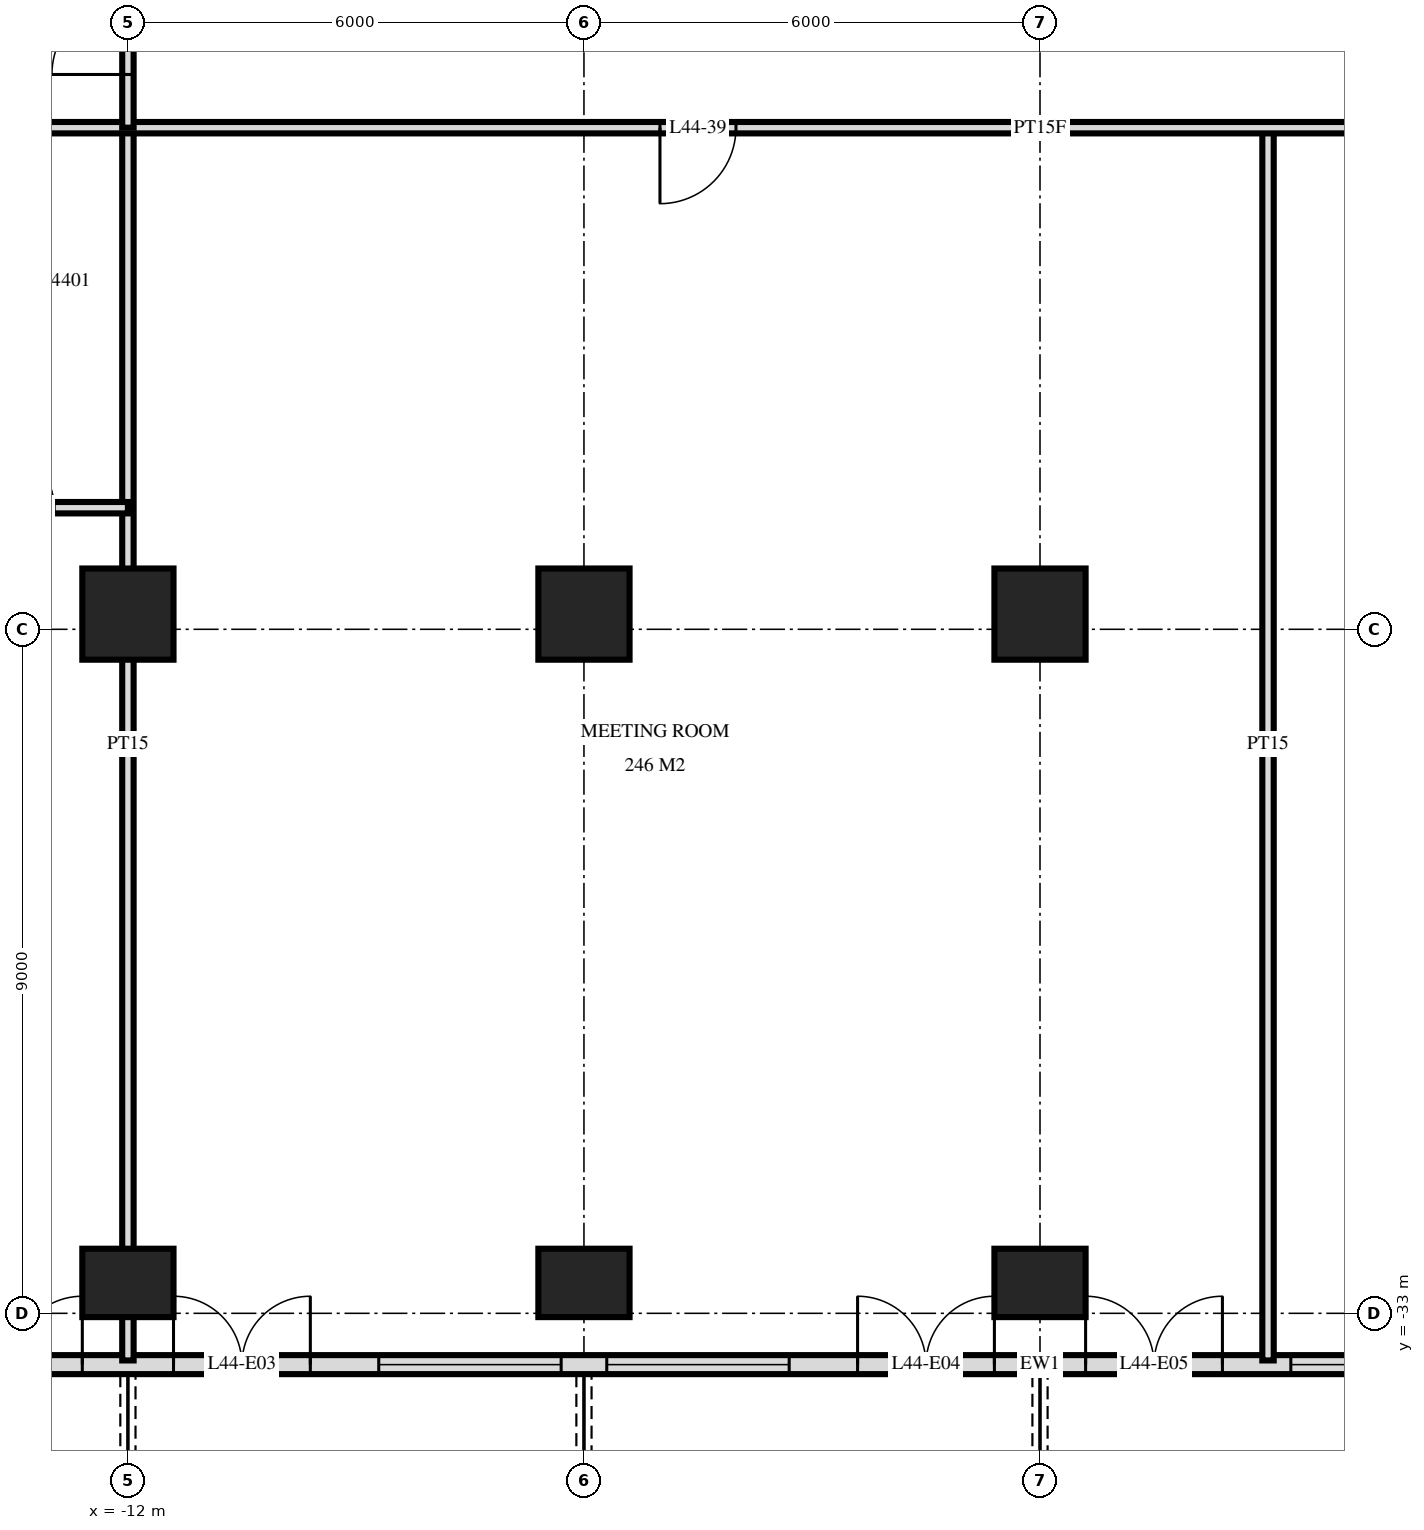
"""IFC4 building model, lengths in metres.
Left out: names, types, materials, properties, quantities, classifications, styles, units other than length and angle.
Written with IfcOpenShell. Run it as: python <this file> out.ifc"""

import sys

from ifc_helpers import new_model, si_unit, direction, frame, frame_2d, origin, origin_2d, place, context, subcontext, project, spatial, rectangle, extrude, element, fill, save


model = new_model("IFC4")
c1 = context("Model", 3, precision=1e-05, world=origin(), true_north=direction((0.0, 1.0)))
c2 = subcontext(c1, "Body", "Model", "MODEL_VIEW")
j1 = project(units=[si_unit("LENGTHUNIT", "METRE"), si_unit("PLANEANGLEUNIT", "RADIAN")], contexts=[c1])
p1 = place(None, origin())
s1 = spatial("IfcSite", under=j1, at=p1, CompositionType="ELEMENT")
p2 = place(p1, origin())
s2 = spatial("IfcBuilding", under=s1, at=p2, CompositionType="ELEMENT")
p3 = place(p2, frame((0.0, 0.0, 170.4)))
s3 = spatial("IfcBuildingStorey", under=s2, at=p3, CompositionType="ELEMENT", Elevation=170.4)
p4 = place(p3, frame((-12.0, -32.6, 0.0), z_axis=(0.0, 0.0, 1.0), x_axis=(1.0, 0.0, 0.0)))
e1 = element("IfcColumn", 1, at=p4, inside=s3, PredefinedType="COLUMN", context=c2, shape_type="SweptSolid", body=[
    extrude(rectangle(XDim=1.2, YDim=0.9, at=origin_2d()), origin(), (0.0, 0.0, 1.0), 3.6),
])
p5 = place(p3, frame((-12.0, -23.8, 0.0), z_axis=(0.0, 0.0, 1.0), x_axis=(1.0, 0.0, 0.0)))
e2 = element("IfcColumn", 2, at=p5, inside=s3, PredefinedType="COLUMN", context=c2, shape_type="SweptSolid", body=[
    extrude(rectangle(XDim=1.2, YDim=1.2, at=origin_2d()), origin(), (0.0, 0.0, 1.0), 3.6),
])
p6 = place(p3, frame((-6.0, -32.6, 0.0), z_axis=(0.0, 0.0, 1.0), x_axis=(1.0, 0.0, 0.0)))
e3 = element("IfcColumn", 3, at=p6, inside=s3, PredefinedType="COLUMN", context=c2, shape_type="SweptSolid", body=[
    extrude(rectangle(XDim=1.2, YDim=0.9, at=origin_2d()), origin(), (0.0, 0.0, 1.0), 3.6),
])
p7 = place(p3, frame((-6.0, -23.8, 0.0), z_axis=(0.0, 0.0, 1.0), x_axis=(1.0, 0.0, 0.0)))
e4 = element("IfcColumn", 4, at=p7, inside=s3, PredefinedType="COLUMN", context=c2, shape_type="SweptSolid", body=[
    extrude(rectangle(XDim=1.2, YDim=1.2, at=origin_2d()), origin(), (0.0, 0.0, 1.0), 3.6),
])
p8 = place(p3, frame((0.0, -32.6, 0.0), z_axis=(0.0, 0.0, 1.0), x_axis=(1.0, 0.0, 0.0)))
e5 = element("IfcColumn", 5, at=p8, inside=s3, PredefinedType="COLUMN", context=c2, shape_type="SweptSolid", body=[
    extrude(rectangle(XDim=1.2, YDim=0.9, at=origin_2d()), origin(), (0.0, 0.0, 1.0), 3.6),
])
p9 = place(p3, frame((0.0, -23.8, 0.0), z_axis=(0.0, 0.0, 1.0), x_axis=(1.0, 0.0, 0.0)))
e6 = element("IfcColumn", 6, at=p9, inside=s3, PredefinedType="COLUMN", context=c2, shape_type="SweptSolid", body=[
    extrude(rectangle(XDim=1.2, YDim=1.2, at=origin_2d()), origin(), (0.0, 0.0, 1.0), 3.6),
])
p10 = place(p3, frame((-23.675, -33.675, 0.0), z_axis=(0.0, 0.0, 1.0), x_axis=(1.0, 0.0, 0.0)))
e7 = element("IfcWall", 7, at=p10, inside=s3, PredefinedType="SOLIDWALL", context=c2, shape_type="SweptSolid", body=[
    extrude(rectangle(XDim=47.351, YDim=0.25, at=frame_2d((23.675, 0.0))), origin(), (0.0, 0.0, 1.0), 3.32),
])
p11 = place(p10, frame((0.575, 0.0, 0.0)))
e8 = element("IfcOpeningElement", 8, at=p11, cuts=e7, PredefinedType="OPENING", context=c2, shape_type="SweptSolid", body=[
    extrude(rectangle(XDim=1.8, YDim=2.4, at=frame_2d((0.9, 1.2))), frame((0.0, 0.135, 0.0), z_axis=(0.0, -1.0, 0.0), x_axis=(1.0, 0.0, 0.0)), (0.0, 0.0, 1.0), 0.27),
])
p12 = place(p10, frame((3.425, 0.0, 0.3)))
e9 = element("IfcOpeningElement", 9, at=p12, cuts=e7, PredefinedType="OPENING", context=c2, shape_type="SweptSolid", body=[
    extrude(rectangle(XDim=1.8, YDim=2.1, at=frame_2d((0.9, 1.05))), frame((0.0, 0.135, 0.0), z_axis=(0.0, -1.0, 0.0), x_axis=(1.0, 0.0, 0.0)), (0.0, 0.0, 1.0), 0.27),
])
p13 = place(p10, frame((5.975, 0.0, 0.3)))
e10 = element("IfcOpeningElement", 10, at=p13, cuts=e7, PredefinedType="OPENING", context=c2, shape_type="SweptSolid", body=[
    extrude(rectangle(XDim=2.4, YDim=2.1, at=frame_2d((1.2, 1.05))), frame((0.0, 0.135, 0.0), z_axis=(0.0, -1.0, 0.0), x_axis=(1.0, 0.0, 0.0)), (0.0, 0.0, 1.0), 0.27),
])
p14 = place(p10, frame((9.275, 0.0, 0.0)))
e11 = element("IfcOpeningElement", 11, at=p14, cuts=e7, PredefinedType="OPENING", context=c2, shape_type="SweptSolid", body=[
    extrude(rectangle(XDim=1.8, YDim=2.4, at=frame_2d((0.9, 1.2))), frame((0.0, 0.135, 0.0), z_axis=(0.0, -1.0, 0.0), x_axis=(1.0, 0.0, 0.0)), (0.0, 0.0, 1.0), 0.27),
])
p15 = place(p10, frame((12.275, 0.0, 0.0)))
e12 = element("IfcOpeningElement", 12, at=p15, cuts=e7, PredefinedType="OPENING", context=c2, shape_type="SweptSolid", body=[
    extrude(rectangle(XDim=1.8, YDim=2.4, at=frame_2d((0.9, 1.2))), frame((0.0, 0.135, 0.0), z_axis=(0.0, -1.0, 0.0), x_axis=(1.0, 0.0, 0.0)), (0.0, 0.0, 1.0), 0.27),
])
p16 = place(p10, frame((14.975, 0.0, 0.3)))
e13 = element("IfcOpeningElement", 13, at=p16, cuts=e7, PredefinedType="OPENING", context=c2, shape_type="SweptSolid", body=[
    extrude(rectangle(XDim=2.4, YDim=2.1, at=frame_2d((1.2, 1.05))), frame((0.0, 0.135, 0.0), z_axis=(0.0, -1.0, 0.0), x_axis=(1.0, 0.0, 0.0)), (0.0, 0.0, 1.0), 0.27),
])
p17 = place(p10, frame((17.975, 0.0, 0.3)))
e14 = element("IfcOpeningElement", 14, at=p17, cuts=e7, PredefinedType="OPENING", context=c2, shape_type="SweptSolid", body=[
    extrude(rectangle(XDim=2.4, YDim=2.1, at=frame_2d((1.2, 1.05))), frame((0.0, 0.135, 0.0), z_axis=(0.0, -1.0, 0.0), x_axis=(1.0, 0.0, 0.0)), (0.0, 0.0, 1.0), 0.27),
])
p18 = place(p10, frame((21.275, 0.0, 0.0)))
e15 = element("IfcOpeningElement", 15, at=p18, cuts=e7, PredefinedType="OPENING", context=c2, shape_type="SweptSolid", body=[
    extrude(rectangle(XDim=1.8, YDim=2.4, at=frame_2d((0.9, 1.2))), frame((0.0, 0.135, 0.0), z_axis=(0.0, -1.0, 0.0), x_axis=(1.0, 0.0, 0.0)), (0.0, 0.0, 1.0), 0.27),
])
p19 = place(p10, frame((24.275, 0.0, 0.0)))
e16 = element("IfcOpeningElement", 16, at=p19, cuts=e7, PredefinedType="OPENING", context=c2, shape_type="SweptSolid", body=[
    extrude(rectangle(XDim=1.8, YDim=2.4, at=frame_2d((0.9, 1.2))), frame((0.0, 0.135, 0.0), z_axis=(0.0, -1.0, 0.0), x_axis=(1.0, 0.0, 0.0)), (0.0, 0.0, 1.0), 0.27),
])
p20 = place(p10, frame((26.975, 0.0, 0.3)))
e17 = element("IfcOpeningElement", 17, at=p20, cuts=e7, PredefinedType="OPENING", context=c2, shape_type="SweptSolid", body=[
    extrude(rectangle(XDim=2.4, YDim=2.1, at=frame_2d((1.2, 1.05))), frame((0.0, 0.135, 0.0), z_axis=(0.0, -1.0, 0.0), x_axis=(1.0, 0.0, 0.0)), (0.0, 0.0, 1.0), 0.27),
])
p21 = place(p10, frame((30.275, 0.0, 0.0)))
e18 = element("IfcOpeningElement", 18, at=p21, cuts=e7, PredefinedType="OPENING", context=c2, shape_type="SweptSolid", body=[
    extrude(rectangle(XDim=1.8, YDim=2.4, at=frame_2d((0.9, 1.2))), frame((0.0, 0.135, 0.0), z_axis=(0.0, -1.0, 0.0), x_axis=(1.0, 0.0, 0.0)), (0.0, 0.0, 1.0), 0.27),
])
p22 = place(p10, frame((32.975, 0.0, 0.3)))
e19 = element("IfcOpeningElement", 19, at=p22, cuts=e7, PredefinedType="OPENING", context=c2, shape_type="SweptSolid", body=[
    extrude(rectangle(XDim=2.4, YDim=2.1, at=frame_2d((1.2, 1.05))), frame((0.0, 0.135, 0.0), z_axis=(0.0, -1.0, 0.0), x_axis=(1.0, 0.0, 0.0)), (0.0, 0.0, 1.0), 0.27),
])
p23 = place(p10, frame((35.975, 0.0, 0.3)))
e20 = element("IfcOpeningElement", 20, at=p23, cuts=e7, PredefinedType="OPENING", context=c2, shape_type="SweptSolid", body=[
    extrude(rectangle(XDim=2.4, YDim=2.1, at=frame_2d((1.2, 1.05))), frame((0.0, 0.135, 0.0), z_axis=(0.0, -1.0, 0.0), x_axis=(1.0, 0.0, 0.0)), (0.0, 0.0, 1.0), 0.27),
])
p24 = place(p10, frame((39.275, 0.0, 0.0)))
e21 = element("IfcOpeningElement", 21, at=p24, cuts=e7, PredefinedType="OPENING", context=c2, shape_type="SweptSolid", body=[
    extrude(rectangle(XDim=1.8, YDim=2.4, at=frame_2d((0.9, 1.2))), frame((0.0, 0.135, 0.0), z_axis=(0.0, -1.0, 0.0), x_axis=(1.0, 0.0, 0.0)), (0.0, 0.0, 1.0), 0.27),
])
p25 = place(p10, frame((42.275, 0.0, 0.0)))
e22 = element("IfcOpeningElement", 22, at=p25, cuts=e7, PredefinedType="OPENING", context=c2, shape_type="SweptSolid", body=[
    extrude(rectangle(XDim=1.8, YDim=2.4, at=frame_2d((0.9, 1.2))), frame((0.0, 0.135, 0.0), z_axis=(0.0, -1.0, 0.0), x_axis=(1.0, 0.0, 0.0)), (0.0, 0.0, 1.0), 0.27),
])
p26 = place(p10, frame((45.125, 0.0, 0.3)))
e23 = element("IfcOpeningElement", 23, at=p26, cuts=e7, PredefinedType="OPENING", context=c2, shape_type="SweptSolid", body=[
    extrude(rectangle(XDim=1.8, YDim=2.1, at=frame_2d((0.9, 1.05))), frame((0.0, 0.135, 0.0), z_axis=(0.0, -1.0, 0.0), x_axis=(1.0, 0.0, 0.0)), (0.0, 0.0, 1.0), 0.27),
])
p27 = place(p3, frame((3.0, -33.62, 0.0), z_axis=(0.0, 0.0, 1.0), x_axis=(0.0, 1.0, 0.0)))
e24 = element("IfcWall", 24, at=p27, inside=s3, PredefinedType="PARTITIONING", context=c2, shape_type="SweptSolid", body=[
    extrude(rectangle(XDim=16.22, YDim=0.15, at=frame_2d((8.11, 0.0))), origin(), (0.0, 0.0, 1.0), 3.32),
])
p28 = place(p3, frame((-12.0, -17.4, 0.0), z_axis=(0.0, 0.0, 1.0), x_axis=(0.0, 1.0, 0.0)))
e25 = element("IfcWall", 25, at=p28, inside=s3, PredefinedType="PARTITIONING", context=c2, shape_type="SweptSolid", body=[
    extrude(rectangle(XDim=2.35, YDim=0.15, at=frame_2d((1.175, 0.0))), origin(), (0.0, 0.0, 1.0), 3.32),
])
p29 = place(p28, frame((0.7, 0.0, 0.0)))
e26 = element("IfcOpeningElement", 26, at=p29, cuts=e25, PredefinedType="OPENING", context=c2, shape_type="SweptSolid", body=[
    extrude(rectangle(XDim=1.0, YDim=2.1, at=frame_2d((0.5, 1.05))), frame((0.0, 0.085, 0.0), z_axis=(0.0, -1.0, 0.0), x_axis=(1.0, 0.0, 0.0)), (0.0, 0.0, 1.0), 0.17),
])
p30 = place(p3, frame((-12.0, -33.62, 0.0), z_axis=(0.0, 0.0, 1.0), x_axis=(0.0, 1.0, 0.0)))
e27 = element("IfcWall", 27, at=p30, inside=s3, PredefinedType="PARTITIONING", context=c2, shape_type="SweptSolid", body=[
    extrude(rectangle(XDim=16.22, YDim=0.15, at=frame_2d((8.11, 0.0))), origin(), (0.0, 0.0, 1.0), 3.32),
])
p31 = place(p3, frame((-16.2, -22.4, 0.0), z_axis=(0.0, 0.0, 1.0), x_axis=(1.0, 0.0, 0.0)))
e28 = element("IfcWall", 28, at=p31, inside=s3, PredefinedType="PARTITIONING", context=c2, shape_type="SweptSolid", body=[
    extrude(rectangle(XDim=4.2, YDim=0.15, at=frame_2d((2.1, 0.0))), origin(), (0.0, 0.0, 1.0), 3.32),
])
p32 = place(p31, frame((2.43, 0.0, 0.0)))
e29 = element("IfcOpeningElement", 29, at=p32, cuts=e28, PredefinedType="OPENING", context=c2, shape_type="SweptSolid", body=[
    extrude(rectangle(XDim=0.8, YDim=2.1, at=frame_2d((0.4, 1.05))), frame((0.0, 0.085, 0.0), z_axis=(0.0, -1.0, 0.0), x_axis=(1.0, 0.0, 0.0)), (0.0, 0.0, 1.0), 0.17),
])
p33 = place(p3, frame((-28.02, -17.4, 0.0), z_axis=(0.0, 0.0, 1.0), x_axis=(1.0, 0.0, 0.0)))
e30 = element("IfcWall", 30, at=p33, inside=s3, PredefinedType="PARTITIONING", context=c2, shape_type="SweptSolid", body=[
    extrude(rectangle(XDim=56.04, YDim=0.15, at=frame_2d((28.02, 0.0))), origin(), (0.0, 0.0, 1.0), 3.32),
])
p34 = place(p33, frame((10.42, 0.0, 0.0)))
e31 = element("IfcOpeningElement", 31, at=p34, cuts=e30, PredefinedType="OPENING", context=c2, shape_type="SweptSolid", body=[
    extrude(rectangle(XDim=1.0, YDim=2.1, at=frame_2d((0.5, 1.05))), frame((0.0, 0.085, 0.0), z_axis=(0.0, -1.0, 0.0), x_axis=(1.0, 0.0, 0.0)), (0.0, 0.0, 1.0), 0.17),
])
p35 = place(p33, frame((2.32, 0.0, 0.0)))
e32 = element("IfcOpeningElement", 32, at=p35, cuts=e30, PredefinedType="OPENING", context=c2, shape_type="SweptSolid", body=[
    extrude(rectangle(XDim=1.0, YDim=2.1, at=frame_2d((0.5, 1.05))), frame((0.0, 0.085, 0.0), z_axis=(0.0, -1.0, 0.0), x_axis=(1.0, 0.0, 0.0)), (0.0, 0.0, 1.0), 0.17),
])
p36 = place(p33, frame((49.72, 0.0, 0.0)))
e33 = element("IfcOpeningElement", 33, at=p36, cuts=e30, PredefinedType="OPENING", context=c2, shape_type="SweptSolid", body=[
    extrude(rectangle(XDim=1.0, YDim=2.1, at=frame_2d((0.5, 1.05))), frame((0.0, 0.085, 0.0), z_axis=(0.0, -1.0, 0.0), x_axis=(1.0, 0.0, 0.0)), (0.0, 0.0, 1.0), 0.17),
])
p37 = place(p33, frame((23.02, 0.0, 0.0)))
e34 = element("IfcOpeningElement", 34, at=p37, cuts=e30, PredefinedType="OPENING", context=c2, shape_type="SweptSolid", body=[
    extrude(rectangle(XDim=1.0, YDim=2.1, at=frame_2d((0.5, 1.05))), frame((0.0, 0.085, 0.0), z_axis=(0.0, -1.0, 0.0), x_axis=(1.0, 0.0, 0.0)), (0.0, 0.0, 1.0), 0.17),
])
p38 = place(p33, frame((35.02, 0.0, 0.0)))
e35 = element("IfcOpeningElement", 35, at=p38, cuts=e30, PredefinedType="OPENING", context=c2, shape_type="SweptSolid", body=[
    extrude(rectangle(XDim=1.0, YDim=2.1, at=frame_2d((0.5, 1.05))), frame((0.0, 0.085, 0.0), z_axis=(0.0, -1.0, 0.0), x_axis=(1.0, 0.0, 0.0)), (0.0, 0.0, 1.0), 0.17),
])
p39 = place(p14, origin())
e36 = element("IfcDoor", 36, at=p39, inside=s3, OperationType="DOUBLE_DOOR_SINGLE_SWING", PredefinedType="DOOR", context=c2, shape_type="SweptSolid", body=[
    extrude(rectangle(XDim=1.8, YDim=2.4, at=frame_2d((0.9, 1.2))), frame((0.0, 0.025, 0.0), z_axis=(0.0, -1.0, 0.0), x_axis=(1.0, 0.0, 0.0)), (0.0, 0.0, 1.0), 0.05),
])
fill(e11, e36)
p40 = place(p15, origin())
e37 = element("IfcDoor", 37, at=p40, inside=s3, OperationType="DOUBLE_DOOR_SINGLE_SWING", PredefinedType="DOOR", context=c2, shape_type="SweptSolid", body=[
    extrude(rectangle(XDim=1.8, YDim=2.4, at=frame_2d((0.9, 1.2))), frame((0.0, 0.025, 0.0), z_axis=(0.0, -1.0, 0.0), x_axis=(1.0, 0.0, 0.0)), (0.0, 0.0, 1.0), 0.05),
])
fill(e12, e37)
p41 = place(p16, origin())
e38 = element("IfcWindow", 38, at=p41, inside=s3, PartitioningType="SINGLE_PANEL", PredefinedType="WINDOW", context=c2, shape_type="SweptSolid", body=[
    extrude(rectangle(XDim=2.4, YDim=2.1, at=frame_2d((1.2, 1.05))), frame((0.0, 0.03, 0.0), z_axis=(0.0, -1.0, 0.0), x_axis=(1.0, 0.0, 0.0)), (0.0, 0.0, 1.0), 0.06),
])
fill(e13, e38)
p42 = place(p17, origin())
e39 = element("IfcWindow", 39, at=p42, inside=s3, PartitioningType="SINGLE_PANEL", PredefinedType="WINDOW", context=c2, shape_type="SweptSolid", body=[
    extrude(rectangle(XDim=2.4, YDim=2.1, at=frame_2d((1.2, 1.05))), frame((0.0, 0.03, 0.0), z_axis=(0.0, -1.0, 0.0), x_axis=(1.0, 0.0, 0.0)), (0.0, 0.0, 1.0), 0.06),
])
fill(e14, e39)
p43 = place(p18, origin())
e40 = element("IfcDoor", 40, at=p43, inside=s3, OperationType="DOUBLE_DOOR_SINGLE_SWING", PredefinedType="DOOR", context=c2, shape_type="SweptSolid", body=[
    extrude(rectangle(XDim=1.8, YDim=2.4, at=frame_2d((0.9, 1.2))), frame((0.0, 0.025, 0.0), z_axis=(0.0, -1.0, 0.0), x_axis=(1.0, 0.0, 0.0)), (0.0, 0.0, 1.0), 0.05),
])
fill(e15, e40)
p44 = place(p19, origin())
e41 = element("IfcDoor", 41, at=p44, inside=s3, OperationType="DOUBLE_DOOR_SINGLE_SWING", PredefinedType="DOOR", context=c2, shape_type="SweptSolid", body=[
    extrude(rectangle(XDim=1.8, YDim=2.4, at=frame_2d((0.9, 1.2))), frame((0.0, 0.025, 0.0), z_axis=(0.0, -1.0, 0.0), x_axis=(1.0, 0.0, 0.0)), (0.0, 0.0, 1.0), 0.05),
])
fill(e16, e41)
p45 = place(p20, origin())
e42 = element("IfcWindow", 42, at=p45, inside=s3, PartitioningType="SINGLE_PANEL", PredefinedType="WINDOW", context=c2, shape_type="SweptSolid", body=[
    extrude(rectangle(XDim=2.4, YDim=2.1, at=frame_2d((1.2, 1.05))), frame((0.0, 0.03, 0.0), z_axis=(0.0, -1.0, 0.0), x_axis=(1.0, 0.0, 0.0)), (0.0, 0.0, 1.0), 0.06),
])
fill(e17, e42)
p46 = place(p29, origin())
e43 = element("IfcDoor", 43, at=p46, inside=s3, OperationType="SINGLE_SWING_RIGHT", PredefinedType="DOOR", context=c2, shape_type="SweptSolid", body=[
    extrude(rectangle(XDim=1.0, YDim=2.1, at=frame_2d((0.5, 1.05))), frame((0.0, 0.025, 0.0), z_axis=(0.0, -1.0, 0.0), x_axis=(1.0, 0.0, 0.0)), (0.0, 0.0, 1.0), 0.05),
])
fill(e26, e43)
p47 = place(p37, frame((0.5, 0.0, 0.0), z_axis=(0.0, 0.0, 1.0), x_axis=(-1.0, 0.0, 0.0)))
e44 = element("IfcDoor", 44, at=p47, inside=s3, OperationType="SINGLE_SWING_LEFT", PredefinedType="DOOR", context=c2, shape_type="SweptSolid", body=[
    extrude(rectangle(XDim=1.0, YDim=2.1, at=frame_2d((0.0, 1.05))), frame((0.0, -0.025, 0.0), z_axis=(0.0, 1.0, 0.0), x_axis=(-1.0, 0.0, 0.0)), (0.0, 0.0, 1.0), 0.05),
])
fill(e34, e44)
p48 = place(p32, origin())
e45 = element("IfcDoor", 45, at=p48, inside=s3, OperationType="SINGLE_SWING_RIGHT", PredefinedType="DOOR", context=c2, shape_type="SweptSolid", body=[
    extrude(rectangle(XDim=0.8, YDim=2.1, at=frame_2d((0.4, 1.05))), frame((0.0, 0.025, 0.0), z_axis=(0.0, -1.0, 0.0), x_axis=(1.0, 0.0, 0.0)), (0.0, 0.0, 1.0), 0.05),
])
fill(e29, e45)
save(model, sys.argv[1])
